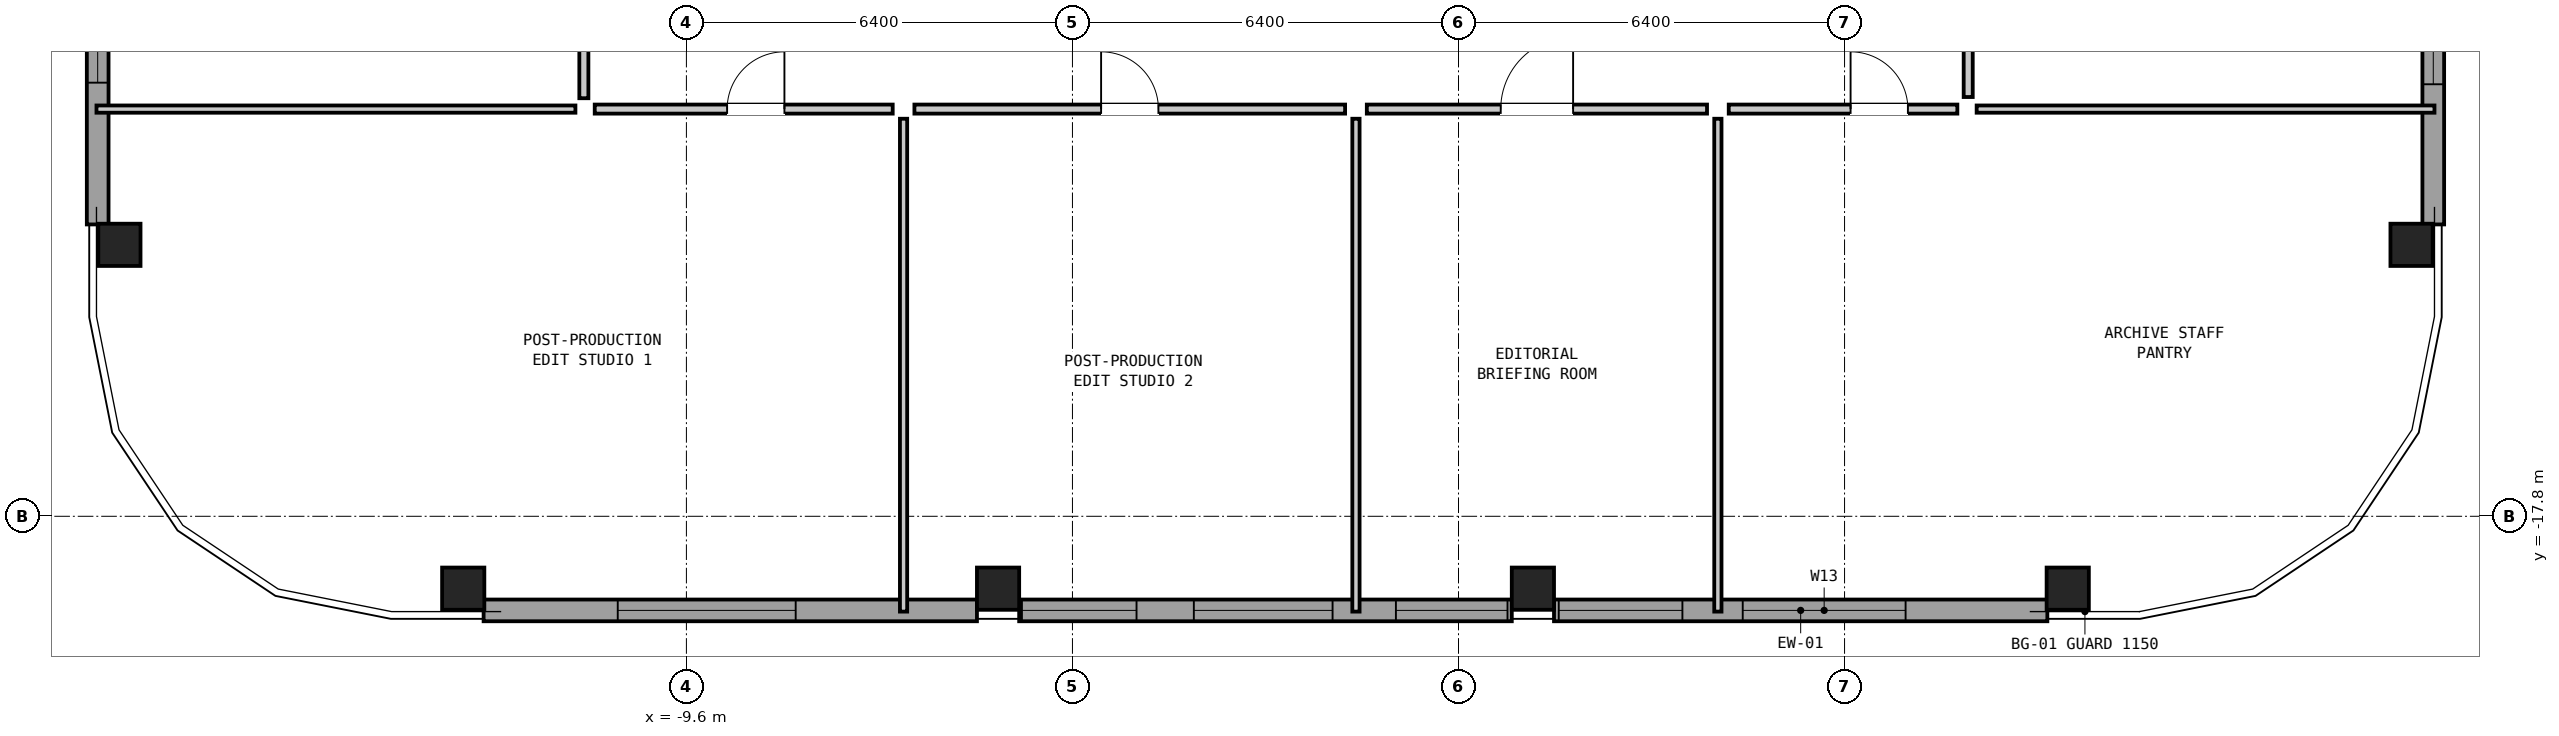
"""IFC4 building model, lengths in metres.
Left out: names, types, materials, properties, quantities, classifications, styles, units other than length and angle.
Written with IfcOpenShell. Run it as: python <this file> out.ifc"""

import sys

from ifc_helpers import new_model, si_unit, direction, frame, frame_2d, origin, origin_2d, place, context, subcontext, project, spatial, rectangle, hollow_rectangle, extrude, element, fill, save


model = new_model("IFC4")
c1 = context("Model", 3, precision=1e-05, world=origin(), true_north=direction((0.0, 1.0)))
c2 = subcontext(c1, "Body", "Model", "MODEL_VIEW")
j1 = project(units=[si_unit("LENGTHUNIT", "METRE"), si_unit("PLANEANGLEUNIT", "RADIAN")], contexts=[c1])
p1 = place(None, origin())
s1 = spatial("IfcSite", under=j1, at=p1, CompositionType="ELEMENT")
p2 = place(p1, origin())
s2 = spatial("IfcBuilding", under=s1, at=p2, CompositionType="ELEMENT")
p3 = place(p2, frame((0.0, 0.0, 217.8)))
s3 = spatial("IfcBuildingStorey", under=s2, at=p3, CompositionType="ELEMENT", Elevation=217.8)
for number, where, z_axis, x_axis in (
    (1, (-13.3, -19.0, 0.0), (0.0, 0.0, 1.0), (1.0, 0.0, 0.0)),
    (2, (-4.433, -19.0, 0.0), (0.0, 0.0, 1.0), (1.0, 0.0, 0.0)),
    (3, (4.433, -19.0, 0.0), (0.0, 0.0, 1.0), (1.0, 0.0, 0.0)),
    (4, (13.3, -19.0, 0.0), (0.0, 0.0, 1.0), (1.0, 0.0, 0.0)),
    (5, (19.0, -13.3, 0.0), (0.0, 0.0, 1.0), (0.0, 1.0, 0.0)),
    (6, (-19.0, -13.3, 0.0), (0.0, 0.0, 1.0), (0.0, 1.0, 0.0)),
):
    element("IfcColumn", number, at=place(p3, frame(where, z_axis=z_axis, x_axis=x_axis)), inside=s3, PredefinedType="COLUMN", context=c2, shape_type="SweptSolid", body=[
        extrude(hollow_rectangle(XDim=0.7, YDim=0.7, WallThickness=0.045, at=origin_2d()), origin(), (0.0, 0.0, 1.0), 3.05),
    ])
p4 = place(p3, frame((12.962, -19.36, 0.0), z_axis=(0.0, 0.0, 1.0), x_axis=(-1.0, 0.0, 0.0)))
e7 = element("IfcWall", 7, at=p4, inside=s3, PredefinedType="SOLIDWALL", context=c2, shape_type="SweptSolid", body=[
    extrude(rectangle(XDim=8.179, YDim=0.36, at=frame_2d((4.089, 0.0))), origin(), (0.0, 0.0, 1.0), 2.374),
])
p5 = place(p4, frame((2.35, 0.0, 1.4)))
e8 = element("IfcOpeningElement", 8, at=p5, cuts=e7, PredefinedType="OPENING", context=c2, shape_type="SweptSolid", body=[
    extrude(rectangle(XDim=2.7, YDim=0.8, at=frame_2d((1.35, 0.4))), frame((0.0, 0.192, 0.0), z_axis=(0.0, -1.0, 0.0), x_axis=(1.0, 0.0, 0.0)), (0.0, 0.0, 1.0), 0.384),
])
p6 = place(p4, frame((6.05, 0.0, 0.2)))
e9 = element("IfcOpeningElement", 9, at=p6, cuts=e7, PredefinedType="OPENING", context=c2, shape_type="SweptSolid", body=[
    extrude(rectangle(XDim=2.05, YDim=1.0, at=frame_2d((1.025, 0.5))), frame((0.0, 0.192, 0.0), z_axis=(0.0, -1.0, 0.0), x_axis=(1.0, 0.0, 0.0)), (0.0, 0.0, 1.0), 0.384),
])
p7 = place(p3, frame((4.083, -19.36, 0.0), z_axis=(0.0, 0.0, 1.0), x_axis=(-1.0, 0.0, 0.0)))
e10 = element("IfcWall", 10, at=p7, inside=s3, PredefinedType="SOLIDWALL", context=c2, shape_type="SweptSolid", body=[
    extrude(rectangle(XDim=8.167, YDim=0.36, at=frame_2d((4.083, 0.0))), origin(), (0.0, 0.0, 1.0), 2.374),
])
p8 = place(p7, frame((0.071, 0.0, 0.2)))
e11 = element("IfcOpeningElement", 11, at=p8, cuts=e10, PredefinedType="OPENING", context=c2, shape_type="SweptSolid", body=[
    extrude(rectangle(XDim=1.85, YDim=0.9, at=frame_2d((0.925, 0.45))), frame((0.0, 0.192, 0.0), z_axis=(0.0, -1.0, 0.0), x_axis=(1.0, 0.0, 0.0)), (0.0, 0.0, 1.0), 0.384),
])
p9 = place(p7, frame((2.971, 0.0, 1.3)))
e12 = element("IfcOpeningElement", 12, at=p9, cuts=e10, PredefinedType="OPENING", context=c2, shape_type="SweptSolid", body=[
    extrude(rectangle(XDim=2.3, YDim=0.9, at=frame_2d((1.15, 0.45))), frame((0.0, 0.192, 0.0), z_axis=(0.0, -1.0, 0.0), x_axis=(1.0, 0.0, 0.0)), (0.0, 0.0, 1.0), 0.384),
])
p10 = place(p7, frame((6.221, 0.0, 0.2)))
e13 = element("IfcOpeningElement", 13, at=p10, cuts=e10, PredefinedType="OPENING", context=c2, shape_type="SweptSolid", body=[
    extrude(rectangle(XDim=1.9, YDim=0.9, at=frame_2d((0.95, 0.45))), frame((0.0, 0.192, 0.0), z_axis=(0.0, -1.0, 0.0), x_axis=(1.0, 0.0, 0.0)), (0.0, 0.0, 1.0), 0.384),
])
p11 = place(p3, frame((-4.783, -19.36, 0.0), z_axis=(0.0, 0.0, 1.0), x_axis=(-1.0, 0.0, 0.0)))
e14 = element("IfcWall", 14, at=p11, inside=s3, PredefinedType="SOLIDWALL", context=c2, shape_type="SweptSolid", body=[
    extrude(rectangle(XDim=8.179, YDim=0.36, at=frame_2d((4.089, 0.0))), origin(), (0.0, 0.0, 1.0), 2.374),
])
p12 = place(p11, frame((3.005, 0.0, 1.45)))
e15 = element("IfcOpeningElement", 15, at=p12, cuts=e14, PredefinedType="OPENING", context=c2, shape_type="SweptSolid", body=[
    extrude(rectangle(XDim=2.95, YDim=0.75, at=frame_2d((1.475, 0.375))), frame((0.0, 0.192, 0.0), z_axis=(0.0, -1.0, 0.0), x_axis=(1.0, 0.0, 0.0)), (0.0, 0.0, 1.0), 0.384),
])
p13 = place(p3, frame((19.36, -4.783, 0.0), z_axis=(0.0, 0.0, 1.0), x_axis=(0.0, -1.0, 0.0)))
e16 = element("IfcWall", 16, at=p13, inside=s3, PredefinedType="SOLIDWALL", context=c2, shape_type="SweptSolid", body=[
    extrude(rectangle(XDim=8.179, YDim=0.36, at=frame_2d((4.089, 0.0))), origin(), (0.0, 0.0, 1.0), 2.374),
])
p14 = place(p13, frame((0.055, 0.0, 0.2)))
e17 = element("IfcOpeningElement", 17, at=p14, cuts=e16, PredefinedType="OPENING", context=c2, shape_type="SweptSolid", body=[
    extrude(rectangle(XDim=2.15, YDim=1.05, at=frame_2d((1.075, 0.525))), frame((0.0, 0.192, 0.0), z_axis=(0.0, -1.0, 0.0), x_axis=(1.0, 0.0, 0.0)), (0.0, 0.0, 1.0), 0.384),
])
p15 = place(p13, frame((3.155, 0.0, 1.3)))
e18 = element("IfcOpeningElement", 18, at=p15, cuts=e16, PredefinedType="OPENING", context=c2, shape_type="SweptSolid", body=[
    extrude(rectangle(XDim=2.7, YDim=0.9, at=frame_2d((1.35, 0.45))), frame((0.0, 0.192, 0.0), z_axis=(0.0, -1.0, 0.0), x_axis=(1.0, 0.0, 0.0)), (0.0, 0.0, 1.0), 0.384),
])
p16 = place(p3, frame((-19.36, -12.962, 0.0), z_axis=(0.0, 0.0, 1.0), x_axis=(0.0, 1.0, 0.0)))
e19 = element("IfcWall", 19, at=p16, inside=s3, PredefinedType="SOLIDWALL", context=c2, shape_type="SweptSolid", body=[
    extrude(rectangle(XDim=8.179, YDim=0.36, at=frame_2d((4.089, 0.0))), origin(), (0.0, 0.0, 1.0), 2.374),
])
p17 = place(p16, frame((2.35, 0.0, 1.3)))
e20 = element("IfcOpeningElement", 20, at=p17, cuts=e19, PredefinedType="OPENING", context=c2, shape_type="SweptSolid", body=[
    extrude(rectangle(XDim=2.7, YDim=0.9, at=frame_2d((1.35, 0.45))), frame((0.0, 0.192, 0.0), z_axis=(0.0, -1.0, 0.0), x_axis=(1.0, 0.0, 0.0)), (0.0, 0.0, 1.0), 0.384),
])
p18 = place(p16, frame((5.95, 0.0, 0.2)))
e21 = element("IfcOpeningElement", 21, at=p18, cuts=e19, PredefinedType="OPENING", context=c2, shape_type="SweptSolid", body=[
    extrude(rectangle(XDim=2.15, YDim=1.05, at=frame_2d((1.075, 0.525))), frame((0.0, 0.192, 0.0), z_axis=(0.0, -1.0, 0.0), x_axis=(1.0, 0.0, 0.0)), (0.0, 0.0, 1.0), 0.384),
])
p19 = place(p3, frame((-19.38, -11.05, 0.0), z_axis=(0.0, 0.0, 1.0), x_axis=(1.0, 0.0, 0.0)))
e22 = element("IfcWall", 22, at=p19, inside=s3, PredefinedType="PARTITIONING", context=c2, shape_type="SweptSolid", body=[
    extrude(rectangle(XDim=7.94, YDim=0.12, at=frame_2d((3.97, 0.0))), origin(), (0.0, 0.0, 1.0), 2.86),
])
p20 = place(p3, frame((11.79, -11.05, 0.0), z_axis=(0.0, 0.0, 1.0), x_axis=(1.0, 0.0, 0.0)))
e23 = element("IfcWall", 23, at=p20, inside=s3, PredefinedType="PARTITIONING", context=c2, shape_type="SweptSolid", body=[
    extrude(rectangle(XDim=7.59, YDim=0.12, at=frame_2d((3.795, 0.0))), origin(), (0.0, 0.0, 1.0), 2.86),
])
p21 = place(p3, frame((-6.0, -19.38, 0.0), z_axis=(0.0, 0.0, 1.0), x_axis=(0.0, 1.0, 0.0)))
e24 = element("IfcWall", 24, at=p21, inside=s3, PredefinedType="PARTITIONING", context=c2, shape_type="SweptSolid", body=[
    extrude(rectangle(XDim=8.17, YDim=0.12, at=frame_2d((4.085, 0.0))), origin(), (0.0, 0.0, 1.0), 2.381),
])
for number, where, z_axis, x_axis in (
    (25, (1.5, -19.38, 0.0), (0.0, 0.0, 1.0), (0.0, 1.0, 0.0)),
    (26, (7.5, -19.38, 0.0), (0.0, 0.0, 1.0), (0.0, 1.0, 0.0)),
):
    element("IfcWall", number, at=place(p3, frame(where, z_axis=z_axis, x_axis=x_axis)), inside=s3, PredefinedType="PARTITIONING", context=c2, shape_type="SweptSolid", body=[
        extrude(rectangle(XDim=8.17, YDim=0.12, at=frame_2d((4.085, 0.0))), origin(), (0.0, 0.0, 1.0), 2.86),
    ])
p22 = place(p3, frame((-11.12, -11.05, 0.0), z_axis=(0.0, 0.0, 1.0), x_axis=(1.0, 0.0, 0.0)))
e27 = element("IfcWall", 27, at=p22, inside=s3, PredefinedType="PARTITIONING", context=c2, shape_type="SweptSolid", body=[
    extrude(rectangle(XDim=4.94, YDim=0.15, at=frame_2d((2.47, 0.0))), origin(), (0.0, 0.0, 1.0), 2.86),
])
p23 = place(p22, frame((2.195, 0.0, 0.0)))
e28 = element("IfcOpeningElement", 28, at=p23, cuts=e27, PredefinedType="OPENING", context=c2, shape_type="SweptSolid", body=[
    extrude(rectangle(XDim=0.95, YDim=2.1, at=frame_2d((0.475, 1.05))), frame((0.0, 0.087, 0.0), z_axis=(0.0, -1.0, 0.0), x_axis=(1.0, 0.0, 0.0)), (0.0, 0.0, 1.0), 0.174),
])
p24 = place(p3, frame((-5.82, -11.05, 0.0), z_axis=(0.0, 0.0, 1.0), x_axis=(1.0, 0.0, 0.0)))
e29 = element("IfcWall", 29, at=p24, inside=s3, PredefinedType="PARTITIONING", context=c2, shape_type="SweptSolid", body=[
    extrude(rectangle(XDim=7.14, YDim=0.15, at=frame_2d((3.57, 0.0))), origin(), (0.0, 0.0, 1.0), 2.86),
])
p25 = place(p24, frame((3.095, 0.0, 0.0)))
e30 = element("IfcOpeningElement", 30, at=p25, cuts=e29, PredefinedType="OPENING", context=c2, shape_type="SweptSolid", body=[
    extrude(rectangle(XDim=0.95, YDim=2.1, at=frame_2d((0.475, 1.05))), frame((0.0, 0.087, 0.0), z_axis=(0.0, -1.0, 0.0), x_axis=(1.0, 0.0, 0.0)), (0.0, 0.0, 1.0), 0.174),
])
p26 = place(p3, frame((1.68, -11.05, 0.0), z_axis=(0.0, 0.0, 1.0), x_axis=(1.0, 0.0, 0.0)))
e31 = element("IfcWall", 31, at=p26, inside=s3, PredefinedType="PARTITIONING", context=c2, shape_type="SweptSolid", body=[
    extrude(rectangle(XDim=5.64, YDim=0.15, at=frame_2d((2.82, 0.0))), origin(), (0.0, 0.0, 1.0), 2.86),
])
p27 = place(p26, frame((2.22, 0.0, 0.0)))
e32 = element("IfcOpeningElement", 32, at=p27, cuts=e31, PredefinedType="OPENING", context=c2, shape_type="SweptSolid", body=[
    extrude(rectangle(XDim=1.2, YDim=2.1, at=frame_2d((0.6, 1.05))), frame((0.0, 0.087, 0.0), z_axis=(0.0, -1.0, 0.0), x_axis=(1.0, 0.0, 0.0)), (0.0, 0.0, 1.0), 0.174),
])
p28 = place(p3, frame((7.68, -11.05, 0.0), z_axis=(0.0, 0.0, 1.0), x_axis=(1.0, 0.0, 0.0)))
e33 = element("IfcWall", 33, at=p28, inside=s3, PredefinedType="PARTITIONING", context=c2, shape_type="SweptSolid", body=[
    extrude(rectangle(XDim=3.79, YDim=0.15, at=frame_2d((1.895, 0.0))), origin(), (0.0, 0.0, 1.0), 2.86),
])
p29 = place(p28, frame((2.02, 0.0, 0.0)))
e34 = element("IfcOpeningElement", 34, at=p29, cuts=e33, PredefinedType="OPENING", context=c2, shape_type="SweptSolid", body=[
    extrude(rectangle(XDim=0.95, YDim=2.1, at=frame_2d((0.475, 1.05))), frame((0.0, 0.087, 0.0), z_axis=(0.0, -1.0, 0.0), x_axis=(1.0, 0.0, 0.0)), (0.0, 0.0, 1.0), 0.174),
])
p30 = place(p3, frame((-11.3, -10.87, 0.0), z_axis=(0.0, 0.0, 1.0), x_axis=(0.0, 1.0, 0.0)))
e35 = element("IfcWall", 35, at=p30, inside=s3, PredefinedType="PARTITIONING", context=c2, shape_type="SweptSolid", body=[
    extrude(rectangle(XDim=7.69, YDim=0.15, at=frame_2d((3.845, 0.0))), origin(), (0.0, 0.0, 1.0), 2.86),
])
p31 = place(p30, frame((3.37, 0.0, 0.0)))
e36 = element("IfcOpeningElement", 36, at=p31, cuts=e35, PredefinedType="OPENING", context=c2, shape_type="SweptSolid", body=[
    extrude(rectangle(XDim=0.95, YDim=2.1, at=frame_2d((0.475, 1.05))), frame((0.0, 0.087, 0.0), z_axis=(0.0, -1.0, 0.0), x_axis=(1.0, 0.0, 0.0)), (0.0, 0.0, 1.0), 0.174),
])
p32 = place(p3, frame((11.65, -10.85, 0.0), z_axis=(0.0, 0.0, 1.0), x_axis=(0.0, 1.0, 0.0)))
e37 = element("IfcWall", 37, at=p32, inside=s3, PredefinedType="PARTITIONING", context=c2, shape_type="SweptSolid", body=[
    extrude(rectangle(XDim=8.29, YDim=0.15, at=frame_2d((4.145, 0.0))), origin(), (0.0, 0.0, 1.0), 2.86),
])
p33 = place(p32, frame((3.67, 0.0, 0.0)))
e38 = element("IfcOpeningElement", 38, at=p33, cuts=e37, PredefinedType="OPENING", context=c2, shape_type="SweptSolid", body=[
    extrude(rectangle(XDim=0.95, YDim=2.1, at=frame_2d((0.475, 1.05))), frame((0.0, 0.087, 0.0), z_axis=(0.0, -1.0, 0.0), x_axis=(1.0, 0.0, 0.0)), (0.0, 0.0, 1.0), 0.174),
])
p34 = place(p5, origin())
e39 = element("IfcWindow", 39, at=p34, inside=s3, PartitioningType="SINGLE_PANEL", PredefinedType="WINDOW", context=c2, shape_type="SweptSolid", body=[
    extrude(rectangle(XDim=2.7, YDim=0.8, at=frame_2d((1.35, 0.4))), frame((0.0, 0.03, 0.0), z_axis=(0.0, -1.0, 0.0), x_axis=(1.0, 0.0, 0.0)), (0.0, 0.0, 1.0), 0.06),
])
fill(e8, e39)
p35 = place(p6, origin())
e40 = element("IfcWindow", 40, at=p35, inside=s3, PartitioningType="SINGLE_PANEL", PredefinedType="WINDOW", context=c2, shape_type="SweptSolid", body=[
    extrude(rectangle(XDim=2.05, YDim=1.0, at=frame_2d((1.025, 0.5))), frame((0.0, 0.03, 0.0), z_axis=(0.0, -1.0, 0.0), x_axis=(1.0, 0.0, 0.0)), (0.0, 0.0, 1.0), 0.06),
])
fill(e9, e40)
p36 = place(p8, origin())
e41 = element("IfcWindow", 41, at=p36, inside=s3, PartitioningType="SINGLE_PANEL", PredefinedType="WINDOW", context=c2, shape_type="SweptSolid", body=[
    extrude(rectangle(XDim=1.85, YDim=0.9, at=frame_2d((0.925, 0.45))), frame((0.0, 0.03, 0.0), z_axis=(0.0, -1.0, 0.0), x_axis=(1.0, 0.0, 0.0)), (0.0, 0.0, 1.0), 0.06),
])
fill(e11, e41)
p37 = place(p9, origin())
e42 = element("IfcWindow", 42, at=p37, inside=s3, PartitioningType="SINGLE_PANEL", PredefinedType="WINDOW", context=c2, shape_type="SweptSolid", body=[
    extrude(rectangle(XDim=2.3, YDim=0.9, at=frame_2d((1.15, 0.45))), frame((0.0, 0.03, 0.0), z_axis=(0.0, -1.0, 0.0), x_axis=(1.0, 0.0, 0.0)), (0.0, 0.0, 1.0), 0.06),
])
fill(e12, e42)
p38 = place(p10, origin())
e43 = element("IfcWindow", 43, at=p38, inside=s3, PartitioningType="SINGLE_PANEL", PredefinedType="WINDOW", context=c2, shape_type="SweptSolid", body=[
    extrude(rectangle(XDim=1.9, YDim=0.9, at=frame_2d((0.95, 0.45))), frame((0.0, 0.03, 0.0), z_axis=(0.0, -1.0, 0.0), x_axis=(1.0, 0.0, 0.0)), (0.0, 0.0, 1.0), 0.06),
])
fill(e13, e43)
p39 = place(p12, origin())
e44 = element("IfcWindow", 44, at=p39, inside=s3, PartitioningType="SINGLE_PANEL", PredefinedType="WINDOW", context=c2, shape_type="SweptSolid", body=[
    extrude(rectangle(XDim=2.95, YDim=0.75, at=frame_2d((1.475, 0.375))), frame((0.0, 0.03, 0.0), z_axis=(0.0, -1.0, 0.0), x_axis=(1.0, 0.0, 0.0)), (0.0, 0.0, 1.0), 0.06),
])
fill(e15, e44)
p40 = place(p15, origin())
e45 = element("IfcWindow", 45, at=p40, inside=s3, PartitioningType="SINGLE_PANEL", PredefinedType="WINDOW", context=c2, shape_type="SweptSolid", body=[
    extrude(rectangle(XDim=2.7, YDim=0.9, at=frame_2d((1.35, 0.45))), frame((0.0, 0.03, 0.0), z_axis=(0.0, -1.0, 0.0), x_axis=(1.0, 0.0, 0.0)), (0.0, 0.0, 1.0), 0.06),
])
fill(e18, e45)
p41 = place(p17, origin())
e46 = element("IfcWindow", 46, at=p41, inside=s3, PartitioningType="SINGLE_PANEL", PredefinedType="WINDOW", context=c2, shape_type="SweptSolid", body=[
    extrude(rectangle(XDim=2.7, YDim=0.9, at=frame_2d((1.35, 0.45))), frame((0.0, 0.03, 0.0), z_axis=(0.0, -1.0, 0.0), x_axis=(1.0, 0.0, 0.0)), (0.0, 0.0, 1.0), 0.06),
])
fill(e20, e46)
p42 = place(p23, origin())
e47 = element("IfcDoor", 47, at=p42, inside=s3, OperationType="SINGLE_SWING_RIGHT", PredefinedType="DOOR", context=c2, shape_type="SweptSolid", body=[
    extrude(rectangle(XDim=0.95, YDim=2.1, at=frame_2d((0.475, 1.05))), frame((0.0, 0.025, 0.0), z_axis=(0.0, -1.0, 0.0), x_axis=(1.0, 0.0, 0.0)), (0.0, 0.0, 1.0), 0.05),
])
fill(e28, e47)
p43 = place(p25, origin())
e48 = element("IfcDoor", 48, at=p43, inside=s3, OperationType="SINGLE_SWING_LEFT", PredefinedType="DOOR", context=c2, shape_type="SweptSolid", body=[
    extrude(rectangle(XDim=0.95, YDim=2.1, at=frame_2d((0.475, 1.05))), frame((0.0, 0.025, 0.0), z_axis=(0.0, -1.0, 0.0), x_axis=(1.0, 0.0, 0.0)), (0.0, 0.0, 1.0), 0.05),
])
fill(e30, e48)
p44 = place(p27, origin())
e49 = element("IfcDoor", 49, at=p44, inside=s3, OperationType="SINGLE_SWING_RIGHT", PredefinedType="DOOR", context=c2, shape_type="SweptSolid", body=[
    extrude(rectangle(XDim=1.2, YDim=2.1, at=frame_2d((0.6, 1.05))), frame((0.0, 0.025, 0.0), z_axis=(0.0, -1.0, 0.0), x_axis=(1.0, 0.0, 0.0)), (0.0, 0.0, 1.0), 0.05),
])
fill(e32, e49)
p45 = place(p29, origin())
e50 = element("IfcDoor", 50, at=p45, inside=s3, OperationType="SINGLE_SWING_LEFT", PredefinedType="DOOR", context=c2, shape_type="SweptSolid", body=[
    extrude(rectangle(XDim=0.95, YDim=2.1, at=frame_2d((0.475, 1.05))), frame((0.0, 0.025, 0.0), z_axis=(0.0, -1.0, 0.0), x_axis=(1.0, 0.0, 0.0)), (0.0, 0.0, 1.0), 0.05),
])
fill(e34, e50)
save(model, sys.argv[1])
